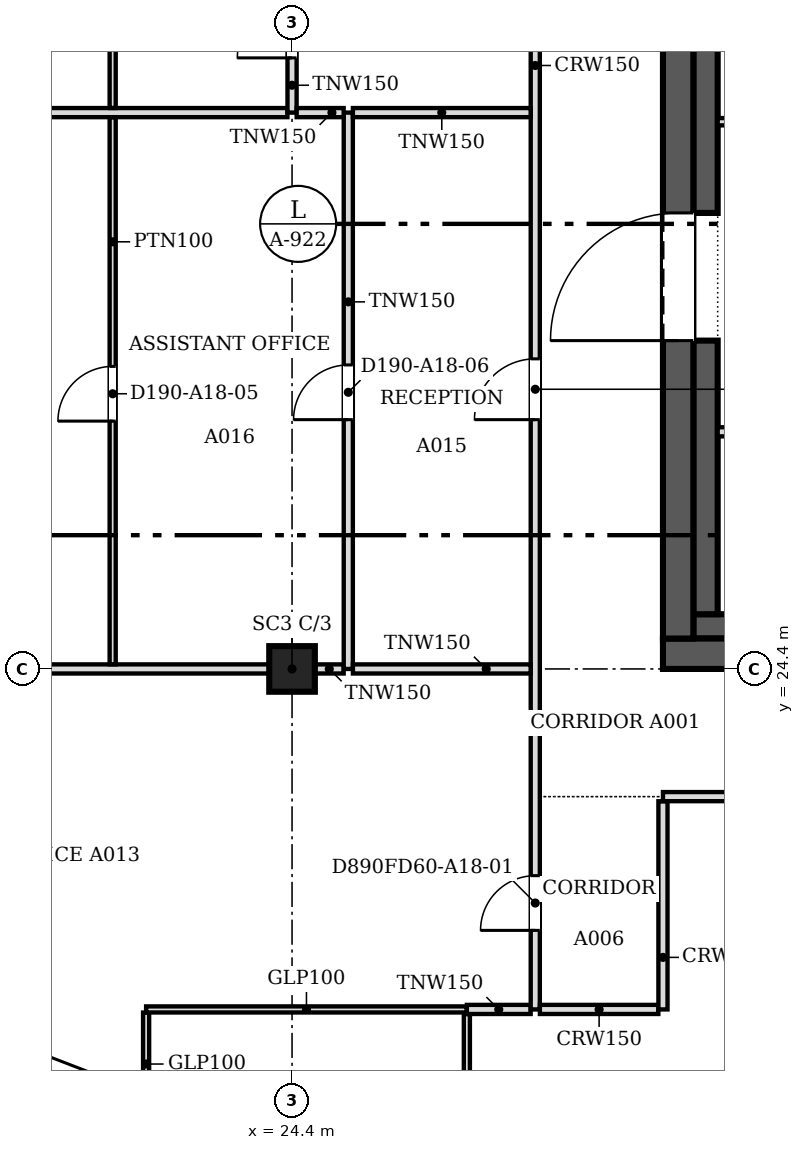
"""IFC4 building model, lengths in metres.
Left out: names, types, materials, properties, quantities, classifications, styles, units other than length and angle.
Written with IfcOpenShell. Run it as: python <this file> out.ifc"""

import sys

from ifc_helpers import new_model, si_unit, direction, frame, frame_2d, origin, origin_2d, place, context, subcontext, project, spatial, polyline, rectangle, outline, extrude, faceted_brep, source, transform, mapped, element, fill, save


model = new_model("IFC4")
c1 = context("Model", 3, precision=1e-05, world=origin(), true_north=direction((0.0, 1.0)))
c2 = subcontext(c1, "Body", "Model", "MODEL_VIEW")
j1 = project(units=[si_unit("LENGTHUNIT", "METRE"), si_unit("PLANEANGLEUNIT", "RADIAN")], contexts=[c1])
p1 = place(None, origin())
s1 = spatial("IfcSite", under=j1, at=p1, CompositionType="ELEMENT")
p2 = place(p1, origin())
s2 = spatial("IfcBuilding", under=s1, at=p2, CompositionType="ELEMENT")
p3 = place(p2, frame((0.0, 0.0, 197.9)))
s3 = spatial("IfcBuildingStorey", under=s2, at=p3, CompositionType="ELEMENT", Elevation=197.9)
p4 = place(p3, frame((24.4, 24.4, 0.0), z_axis=(0.0, 0.0, 1.0), x_axis=(1.0, 0.0, 0.0)))
e1 = element("IfcColumn", 1, at=p4, inside=s3, PredefinedType="COLUMN", context=c2, shape_type="SweptSolid", body=[
    extrude(rectangle(XDim=0.75, YDim=0.75, at=origin_2d()), origin(), (0.0, 0.0, 1.0), 3.6),
])
m1 = source(origin(), c2, "Body", "Brep", [
    faceted_brep([(3.143, -0.25, 0.064), (0.093, -0.25, 3.744), (0.093, -0.25, 0.0), (3.143, -0.25, 0.0), (0.0, 0.25, 3.743), (0.047, 0.25, 3.8), (3.196, 0.25, 0.0), (0.0, 0.25, 0.0), (0.047, 0.0, 3.8), (3.196, -0.0, 0.0)], [[[0, 1, 2, 3]], [[4, 5, 6, 7]], [[6, 5, 8, 1, 0, 9]], [[5, 4, 8]], [[7, 6, 9, 3, 2]], [[7, 2, 1, 8, 4]], [[3, 9, 0]]]),
])
p5 = place(p3, frame((18.303, 18.567, 0.0), z_axis=(0.0, 0.0, 1.0), x_axis=(0.932978940178, -0.359930961693, 0.0)))
e2 = element("IfcWall", 2, at=p5, inside=s3, PredefinedType="SOLIDWALL", context=c2, shape_type="MappedRepresentation", body=[
    mapped(m1, transform((0.0, 0.0, 0.0), scale=1.0)),
])
m2 = source(origin(), c2, "Body", "SweptSolid", [
    extrude(outline(polyline([(2.664, 0.25), (0.247, 3.167), (0.247, 0.25), (2.664, 0.25)])), frame((0.0, 0.26, 0.0), z_axis=(0.0, -1.0, 0.0), x_axis=(1.0, 0.0, 0.0)), (0.0, 0.0, 1.0), 0.52),
])
p6 = place(p5, origin())
e3 = element("IfcOpeningElement", 3, at=p6, cuts=e2, PredefinedType="OPENING", context=c2, shape_type="MappedRepresentation", body=[
    mapped(m2, transform((0.0, 0.0, 0.0), scale=1.0)),
])
p7 = place(p2, frame((0.0, 0.0, 201.7)))
s4 = spatial("IfcBuildingStorey", under=s2, at=p7, CompositionType="ELEMENT", Elevation=201.7)
m3 = source(origin(), c2, "Body", "Brep", [
    faceted_brep([(3.096, -0.25, 7.536), (0.047, -0.25, 3.856), (0.047, -0.25, 3.744), (3.096, -0.25, 0.064), (0.0, 0.25, 3.8), (3.149, 0.25, 7.6), (3.202, 0.25, 7.536), (3.202, 0.25, 0.064), (3.149, 0.25, 0.0), (3.149, -0.0, 0.0), (3.149, -0.0, 7.6), (0.0, 0.0, 3.8)], [[[0, 1, 2, 3]], [[4, 5, 6, 7, 8]], [[8, 7, 9]], [[6, 5, 10]], [[5, 4, 11, 1, 0, 10]], [[4, 8, 9, 3, 2, 11]], [[11, 2, 1]], [[3, 9, 7, 6, 10, 0]]]),
])
p8 = place(p7, frame((18.346, 18.55, -3.8), z_axis=(0.0, 0.0, 1.0), x_axis=(0.932985567668, -0.359913782069, 0.0)))
e4 = element("IfcWall", 4, at=p8, inside=s4, PredefinedType="SOLIDWALL", context=c2, shape_type="MappedRepresentation", body=[
    mapped(m3, transform((0.0, 0.0, 0.0), scale=1.0)),
])
m4 = source(origin(), c2, "Body", "SweptSolid", [
    extrude(outline(polyline([(2.949, 6.967), (0.325, 3.8), (2.949, 0.633), (2.949, 6.967)])), frame((0.0, 0.26, 0.0), z_axis=(0.0, -1.0, 0.0), x_axis=(1.0, 0.0, 0.0)), (0.0, 0.0, 1.0), 0.52),
])
p9 = place(p8, origin())
e5 = element("IfcOpeningElement", 5, at=p9, cuts=e4, PredefinedType="OPENING", context=c2, shape_type="MappedRepresentation", body=[
    mapped(m4, transform((0.0, 0.0, 0.0), scale=1.0)),
])
p10 = place(p3, frame((54.9, 24.65, 0.0), z_axis=(0.0, 0.0, 1.0), x_axis=(-1.0, 0.0, 0.0)))
e6 = element("IfcWall", 6, at=p10, inside=s3, PredefinedType="SHEAR", context=c2, shape_type="SweptSolid", body=[
    extrude(rectangle(XDim=24.4, YDim=0.5, at=frame_2d((12.2, 0.0))), origin(), (0.0, 0.0, 1.0), 3.8),
])
m5 = source(origin(), c2, "Body", "SweptSolid", [
    extrude(rectangle(XDim=1.2, YDim=2.1, at=frame_2d((0.6, 1.05))), frame((0.0, 0.26, 0.0), z_axis=(0.0, -1.0, 0.0), x_axis=(1.0, 0.0, 0.0)), (0.0, 0.0, 1.0), 0.52),
])
p11 = place(p10, frame((1.5, 0.0, 0.0)))
e7 = element("IfcOpeningElement", 7, at=p11, cuts=e6, PredefinedType="OPENING", context=c2, shape_type="MappedRepresentation", body=[
    mapped(m5, transform((0.0, 0.0, 0.0), scale=1.0)),
])
p12 = place(p3, frame((30.75, 24.9, 0.0), z_axis=(0.0, 0.0, 1.0), x_axis=(0.0, 1.0, 0.0)))
e8 = element("IfcWall", 8, at=p12, inside=s3, PredefinedType="SHEAR", context=c2, shape_type="SweptSolid", body=[
    extrude(rectangle(XDim=23.4, YDim=0.5, at=frame_2d((11.7, 0.0))), origin(), (0.0, 0.0, 1.0), 3.8),
])
m6 = source(origin(), c2, "Body", "SweptSolid", [
    extrude(rectangle(XDim=2.1, YDim=2.4, at=frame_2d((1.05, 1.2))), frame((0.0, 0.26, 0.0), z_axis=(0.0, -1.0, 0.0), x_axis=(1.0, 0.0, 0.0)), (0.0, 0.0, 1.0), 0.52),
])
p13 = place(p12, frame((4.9, 0.0, 0.0)))
e9 = element("IfcOpeningElement", 9, at=p13, cuts=e8, PredefinedType="OPENING", context=c2, shape_type="MappedRepresentation", body=[
    mapped(m6, transform((0.0, 0.0, 0.0), scale=1.0)),
])
p14 = place(p12, frame((16.4, 0.0, 0.0)))
e10 = element("IfcOpeningElement", 10, at=p14, cuts=e8, PredefinedType="OPENING", context=c2, shape_type="MappedRepresentation", body=[
    mapped(m6, transform((0.0, 0.0, 0.0), scale=1.0)),
])
p15 = place(p3, frame((31.0, 25.1, 0.0), z_axis=(0.0, 0.0, 1.0), x_axis=(1.0, 0.0, 0.0)))
e11 = element("IfcWall", 11, at=p15, inside=s3, PredefinedType="SOLIDWALL", context=c2, shape_type="SweptSolid", body=[
    extrude(rectangle(XDim=21.2, YDim=0.4, at=frame_2d((10.6, 0.0))), origin(), (0.0, 0.0, 1.0), 3.8),
])
p16 = place(p3, frame((31.2, 25.3, 0.0), z_axis=(0.0, 0.0, 1.0), x_axis=(0.0, 1.0, 0.0)))
e12 = element("IfcWall", 12, at=p16, inside=s3, PredefinedType="SOLIDWALL", context=c2, shape_type="SweptSolid", body=[
    extrude(rectangle(XDim=4.5, YDim=0.4, at=frame_2d((2.25, 0.0))), origin(), (0.0, 0.0, 1.0), 3.8),
])
p17 = place(p3, frame((31.2, 31.9, 0.0), z_axis=(0.0, 0.0, 1.0), x_axis=(0.0, 1.0, 0.0)))
e13 = element("IfcWall", 13, at=p17, inside=s3, PredefinedType="SOLIDWALL", context=c2, shape_type="SweptSolid", body=[
    extrude(rectangle(XDim=9.4, YDim=0.4, at=frame_2d((4.7, 0.0))), origin(), (0.0, 0.0, 1.0), 3.8),
])
p18 = place(p3, frame((42.45, 28.3, 0.0), z_axis=(0.0, 0.0, 1.0), x_axis=(-1.0, 0.0, 0.0)))
e14 = element("IfcWall", 14, at=p18, inside=s3, PredefinedType="PARTITIONING", context=c2, shape_type="SweptSolid", body=[
    extrude(rectangle(XDim=11.05, YDim=0.15, at=frame_2d((5.525, 0.0))), origin(), (0.0, 0.0, 1.0), 3.6),
])
m7 = source(origin(), c2, "Body", "SweptSolid", [
    extrude(rectangle(XDim=0.9, YDim=2.1, at=frame_2d((0.45, 1.05))), frame((0.0, 0.085, 0.0), z_axis=(0.0, -1.0, 0.0), x_axis=(1.0, 0.0, 0.0)), (0.0, 0.0, 1.0), 0.17),
])
p19 = place(p18, frame((4.95, 0.0, 0.0)))
e15 = element("IfcOpeningElement", 15, at=p19, cuts=e14, PredefinedType="OPENING", context=c2, shape_type="MappedRepresentation", body=[
    mapped(m7, transform((0.0, 0.0, 0.0), scale=1.0)),
])
p20 = place(p3, frame((31.4, 33.4, 0.0), z_axis=(0.0, 0.0, 1.0), x_axis=(1.0, 0.0, 0.0)))
e16 = element("IfcWall", 16, at=p20, inside=s3, PredefinedType="PARTITIONING", context=c2, shape_type="SweptSolid", body=[
    extrude(rectangle(XDim=11.05, YDim=0.12, at=frame_2d((5.525, 0.0))), origin(), (0.0, 0.0, 1.0), 3.6),
])
m8 = source(origin(), c2, "Body", "SweptSolid", [
    extrude(rectangle(XDim=0.9, YDim=2.1, at=frame_2d((0.45, 1.05))), frame((0.0, 0.07, 0.0), z_axis=(0.0, -1.0, 0.0), x_axis=(1.0, 0.0, 0.0)), (0.0, 0.0, 1.0), 0.14),
])
p21 = place(p20, frame((2.375, 0.0, 0.0)))
e17 = element("IfcOpeningElement", 17, at=p21, cuts=e16, PredefinedType="OPENING", context=c2, shape_type="MappedRepresentation", body=[
    mapped(m8, transform((0.0, 0.0, 0.0), scale=1.0)),
])
p22 = place(p20, frame((8.025, 0.0, 0.0)))
e18 = element("IfcOpeningElement", 18, at=p22, cuts=e16, PredefinedType="OPENING", context=c2, shape_type="MappedRepresentation", body=[
    mapped(m8, transform((0.0, 0.0, 0.0), scale=1.0)),
])
p23 = place(p3, frame((27.275, 13.276, 0.0), z_axis=(0.0, 0.0, 1.0), x_axis=(0.0, 1.0, 0.0)))
e19 = element("IfcWall", 19, at=p23, inside=s3, PredefinedType="PARTITIONING", context=c2, shape_type="SweptSolid", body=[
    extrude(rectangle(XDim=5.448, YDim=0.1, at=frame_2d((2.724, 0.0))), origin(), (0.0, 0.0, 1.0), 3.067),
])
m9 = source(origin(), c2, "Body", "SweptSolid", [
    extrude(rectangle(XDim=0.9, YDim=2.1, at=frame_2d((0.45, 1.05))), frame((0.0, 0.06, 0.0), z_axis=(0.0, -1.0, 0.0), x_axis=(1.0, 0.0, 0.0)), (0.0, 0.0, 1.0), 0.12),
])
p24 = place(p23, frame((2.3, 0.0, 0.0)))
e20 = element("IfcOpeningElement", 20, at=p24, cuts=e19, PredefinedType="OPENING", context=c2, shape_type="MappedRepresentation", body=[
    mapped(m9, transform((0.0, 0.0, 0.0), scale=1.0)),
])
p25 = place(p3, frame((22.0, 17.055, 0.0), z_axis=(0.0, 0.0, 1.0), x_axis=(0.0, 1.0, 0.0)))
e21 = element("IfcWall", 21, at=p25, inside=s3, PredefinedType="PARTITIONING", context=c2, shape_type="SweptSolid", body=[
    extrude(rectangle(XDim=1.694, YDim=0.1, at=frame_2d((0.847, 0.0))), origin(), (0.0, 0.0, 1.0), 3.067),
])
p26 = place(p3, frame((22.0, 18.8, 0.0), z_axis=(0.0, 0.0, 1.0), x_axis=(1.0, 0.0, 0.0)))
e22 = element("IfcWall", 22, at=p26, inside=s3, PredefinedType="PARTITIONING", context=c2, shape_type="SweptSolid", body=[
    extrude(rectangle(XDim=5.274, YDim=0.1, at=frame_2d((2.637, 0.0))), origin(), (0.0, 0.0, 1.0), 3.067),
])
p27 = place(p3, frame((27.275, 18.8, 0.0), z_axis=(0.0, 0.0, 1.0), x_axis=(1.0, 0.0, 0.0)))
e23 = element("IfcWall", 23, at=p27, inside=s3, PredefinedType="PARTITIONING", context=c2, shape_type="SweptSolid", body=[
    extrude(rectangle(XDim=1.049, YDim=0.15, at=frame_2d((0.524, 0.0))), origin(), (0.0, 0.0, 1.0), 3.067),
])
p28 = place(p3, frame((28.4, 18.8, 0.0), z_axis=(0.0, 0.0, 1.0), x_axis=(0.0, 1.0, 0.0)))
e24 = element("IfcWall", 24, at=p28, inside=s3, PredefinedType="PARTITIONING", context=c2, shape_type="SweptSolid", body=[
    extrude(rectangle(XDim=26.9, YDim=0.15, at=frame_2d((13.45, 0.0))), origin(), (0.0, 0.0, 1.0), 3.067),
])
p29 = place(p28, frame((1.3, 0.0, 0.0)))
e25 = element("IfcOpeningElement", 25, at=p29, cuts=e24, PredefinedType="OPENING", context=c2, shape_type="MappedRepresentation", body=[
    mapped(m7, transform((0.0, 0.0, 0.0), scale=1.0)),
])
m10 = source(origin(), c2, "Body", "SweptSolid", [
    extrude(rectangle(XDim=1.0, YDim=2.1, at=frame_2d((0.5, 1.05))), frame((0.0, 0.085, 0.0), z_axis=(0.0, -1.0, 0.0), x_axis=(1.0, 0.0, 0.0)), (0.0, 0.0, 1.0), 0.17),
])
p30 = place(p28, frame((9.7, 0.0, 0.0)))
e26 = element("IfcOpeningElement", 26, at=p30, cuts=e24, PredefinedType="OPENING", context=c2, shape_type="MappedRepresentation", body=[
    mapped(m10, transform((0.0, 0.0, 0.0), scale=1.0)),
])
p31 = place(p28, frame((20.35, 0.0, 0.0)))
e27 = element("IfcOpeningElement", 27, at=p31, cuts=e24, PredefinedType="OPENING", context=c2, shape_type="MappedRepresentation", body=[
    mapped(m10, transform((0.0, 0.0, 0.0), scale=1.0)),
])
p32 = place(p3, frame((28.476, 18.8, 0.0), z_axis=(0.0, 0.0, 1.0), x_axis=(1.0, 0.0, 0.0)))
e28 = element("IfcWall", 28, at=p32, inside=s3, PredefinedType="PARTITIONING", context=c2, shape_type="SweptSolid", body=[
    extrude(rectangle(XDim=1.948, YDim=0.15, at=frame_2d((0.974, 0.0))), origin(), (0.0, 0.0, 1.0), 3.067),
])
p33 = place(p3, frame((30.5, 18.8, 0.0), z_axis=(0.0, 0.0, 1.0), x_axis=(0.0, 1.0, 0.0)))
e29 = element("IfcWall", 29, at=p33, inside=s3, PredefinedType="PARTITIONING", context=c2, shape_type="SweptSolid", body=[
    extrude(rectangle(XDim=3.424, YDim=0.15, at=frame_2d((1.712, 0.0))), origin(), (0.0, 0.0, 1.0), 3.067),
])
p34 = place(p3, frame((30.5, 22.3, 0.0), z_axis=(0.0, 0.0, 1.0), x_axis=(1.0, 0.0, 0.0)))
e30 = element("IfcWall", 30, at=p34, inside=s3, PredefinedType="PARTITIONING", context=c2, shape_type="SweptSolid", body=[
    extrude(rectangle(XDim=14.5, YDim=0.15, at=frame_2d((7.25, 0.0))), origin(), (0.0, 0.0, 1.0), 3.067),
])
p35 = place(p3, frame((12.576, 24.4, 0.0), z_axis=(0.0, 0.0, 1.0), x_axis=(1.0, 0.0, 0.0)))
e31 = element("IfcWall", 31, at=p35, inside=s3, PredefinedType="PARTITIONING", context=c2, shape_type="SweptSolid", body=[
    extrude(rectangle(XDim=11.448, YDim=0.15, at=frame_2d((5.724, 0.0))), origin(), (0.0, 0.0, 1.0), 3.067),
])
p36 = place(p3, frame((24.776, 24.4, 0.0), z_axis=(0.0, 0.0, 1.0), x_axis=(1.0, 0.0, 0.0)))
e32 = element("IfcWall", 32, at=p36, inside=s3, PredefinedType="PARTITIONING", context=c2, shape_type="SweptSolid", body=[
    extrude(rectangle(XDim=0.473, YDim=0.15, at=frame_2d((0.237, 0.0))), origin(), (0.0, 0.0, 1.0), 3.067),
])
p37 = place(p3, frame((25.325, 24.4, 0.0), z_axis=(0.0, 0.0, 1.0), x_axis=(0.0, 1.0, 0.0)))
e33 = element("IfcWall", 33, at=p37, inside=s3, PredefinedType="PARTITIONING", context=c2, shape_type="SweptSolid", body=[
    extrude(rectangle(XDim=9.15, YDim=0.15, at=frame_2d((4.575, 0.0))), origin(), (0.0, 0.0, 1.0), 3.067),
])
p38 = place(p37, frame((4.1, 0.0, 0.0)))
e34 = element("IfcOpeningElement", 34, at=p38, cuts=e33, PredefinedType="OPENING", context=c2, shape_type="MappedRepresentation", body=[
    mapped(m7, transform((0.0, 0.0, 0.0), scale=1.0)),
])
p39 = place(p3, frame((25.401, 24.4, 0.0), z_axis=(0.0, 0.0, 1.0), x_axis=(1.0, 0.0, 0.0)))
e35 = element("IfcWall", 35, at=p39, inside=s3, PredefinedType="PARTITIONING", context=c2, shape_type="SweptSolid", body=[
    extrude(rectangle(XDim=2.923, YDim=0.15, at=frame_2d((1.461, 0.0))), origin(), (0.0, 0.0, 1.0), 3.067),
])
p40 = place(p3, frame((21.45, 24.476, 0.0), z_axis=(0.0, 0.0, 1.0), x_axis=(0.0, 1.0, 0.0)))
e36 = element("IfcWall", 36, at=p40, inside=s3, PredefinedType="PARTITIONING", context=c2, shape_type="SweptSolid", body=[
    extrude(rectangle(XDim=8.998, YDim=0.1, at=frame_2d((4.499, 0.0))), origin(), (0.0, 0.0, 1.0), 3.067),
])
p41 = place(p40, frame((4.0, 0.0, 0.0)))
e37 = element("IfcOpeningElement", 37, at=p41, cuts=e36, PredefinedType="OPENING", context=c2, shape_type="MappedRepresentation", body=[
    mapped(m9, transform((0.0, 0.0, 0.0), scale=1.0)),
])
p42 = place(p3, frame((12.2, 33.55, 0.0), z_axis=(0.0, 0.0, 1.0), x_axis=(1.0, 0.0, 0.0)))
e38 = element("IfcWall", 38, at=p42, inside=s3, PredefinedType="PARTITIONING", context=c2, shape_type="SweptSolid", body=[
    extrude(rectangle(XDim=12.124, YDim=0.15, at=frame_2d((6.062, 0.0))), origin(), (0.0, 0.0, 1.0), 3.067),
])
p43 = place(p3, frame((24.4, 33.55, 0.0), z_axis=(0.0, 0.0, 1.0), x_axis=(0.0, 1.0, 0.0)))
e39 = element("IfcWall", 39, at=p43, inside=s3, PredefinedType="PARTITIONING", context=c2, shape_type="SweptSolid", body=[
    extrude(rectangle(XDim=2.674, YDim=0.15, at=frame_2d((1.337, 0.0))), origin(), (0.0, 0.0, 1.0), 3.067),
])
p44 = place(p43, frame((0.9, 0.0, 0.0)))
e40 = element("IfcOpeningElement", 40, at=p44, cuts=e39, PredefinedType="OPENING", context=c2, shape_type="MappedRepresentation", body=[
    mapped(m7, transform((0.0, 0.0, 0.0), scale=1.0)),
])
p45 = place(p3, frame((24.476, 33.55, 0.0), z_axis=(0.0, 0.0, 1.0), x_axis=(1.0, 0.0, 0.0)))
e41 = element("IfcWall", 41, at=p45, inside=s3, PredefinedType="PARTITIONING", context=c2, shape_type="SweptSolid", body=[
    extrude(rectangle(XDim=0.773, YDim=0.15, at=frame_2d((0.386, 0.0))), origin(), (0.0, 0.0, 1.0), 3.067),
])
p46 = place(p3, frame((25.401, 33.55, 0.0), z_axis=(0.0, 0.0, 1.0), x_axis=(1.0, 0.0, 0.0)))
e42 = element("IfcWall", 42, at=p46, inside=s3, PredefinedType="PARTITIONING", context=c2, shape_type="SweptSolid", body=[
    extrude(rectangle(XDim=2.923, YDim=0.15, at=frame_2d((1.461, 0.0))), origin(), (0.0, 0.0, 1.0), 3.067),
])
p47 = place(p3, frame((21.45, 33.626, 0.0), z_axis=(0.0, 0.0, 1.0), x_axis=(0.0, 1.0, 0.0)))
e43 = element("IfcWall", 43, at=p47, inside=s3, PredefinedType="PARTITIONING", context=c2, shape_type="SweptSolid", body=[
    extrude(rectangle(XDim=11.998, YDim=0.1, at=frame_2d((5.999, 0.0))), origin(), (0.0, 0.0, 1.0), 3.067),
])
p48 = place(p47, frame((5.5, 0.0, 0.0)))
e44 = element("IfcOpeningElement", 44, at=p48, cuts=e43, PredefinedType="OPENING", context=c2, shape_type="MappedRepresentation", body=[
    mapped(m9, transform((0.0, 0.0, 0.0), scale=1.0)),
])
m11 = source(origin(), c2, "Body", "SweptSolid", [
    extrude(rectangle(XDim=2.1, YDim=2.4, at=frame_2d((1.05, 1.2))), frame((0.0, 0.025, 0.0), z_axis=(0.0, -1.0, 0.0), x_axis=(1.0, 0.0, 0.0)), (0.0, 0.0, 1.0), 0.05),
])
p49 = place(p13, origin())
e45 = element("IfcDoor", 45, at=p49, inside=s3, OperationType="DOUBLE_DOOR_SINGLE_SWING", PredefinedType="DOOR", context=c2, shape_type="MappedRepresentation", body=[
    mapped(m11, transform((0.0, 0.0, 0.0), scale=1.0)),
])
fill(e9, e45)
m12 = source(origin(), c2, "Body", "SweptSolid", [
    extrude(rectangle(XDim=0.9, YDim=2.1, at=frame_2d((0.45, 1.05))), frame((0.0, 0.025, 0.0), z_axis=(0.0, -1.0, 0.0), x_axis=(1.0, 0.0, 0.0)), (0.0, 0.0, 1.0), 0.05),
])
p50 = place(p29, origin())
e46 = element("IfcDoor", 46, at=p50, inside=s3, OperationType="SINGLE_SWING_LEFT", PredefinedType="DOOR", context=c2, shape_type="MappedRepresentation", body=[
    mapped(m12, transform((0.0, 0.0, 0.0), scale=1.0)),
])
fill(e25, e46)
p51 = place(p41, origin())
e47 = element("IfcDoor", 47, at=p51, inside=s3, OperationType="SINGLE_SWING_LEFT", PredefinedType="DOOR", context=c2, shape_type="MappedRepresentation", body=[
    mapped(m12, transform((0.0, 0.0, 0.0), scale=1.0)),
])
fill(e37, e47)
m13 = source(origin(), c2, "Body", "SweptSolid", [
    extrude(rectangle(XDim=1.0, YDim=2.1, at=frame_2d((0.5, 1.05))), frame((0.0, 0.025, 0.0), z_axis=(0.0, -1.0, 0.0), x_axis=(1.0, 0.0, 0.0)), (0.0, 0.0, 1.0), 0.05),
])
p52 = place(p30, origin())
e48 = element("IfcDoor", 48, at=p52, inside=s3, OperationType="SINGLE_SWING_LEFT", PredefinedType="DOOR", context=c2, shape_type="MappedRepresentation", body=[
    mapped(m13, transform((0.0, 0.0, 0.0), scale=1.0)),
])
fill(e26, e48)
p53 = place(p38, origin())
e49 = element("IfcDoor", 49, at=p53, inside=s3, OperationType="SINGLE_SWING_LEFT", PredefinedType="DOOR", context=c2, shape_type="MappedRepresentation", body=[
    mapped(m12, transform((0.0, 0.0, 0.0), scale=1.0)),
])
fill(e34, e49)
p54 = place(p44, origin())
e50 = element("IfcDoor", 50, at=p54, inside=s3, OperationType="SINGLE_SWING_LEFT", PredefinedType="DOOR", context=c2, shape_type="MappedRepresentation", body=[
    mapped(m12, transform((0.0, 0.0, 0.0), scale=1.0)),
])
fill(e40, e50)
save(model, sys.argv[1])
